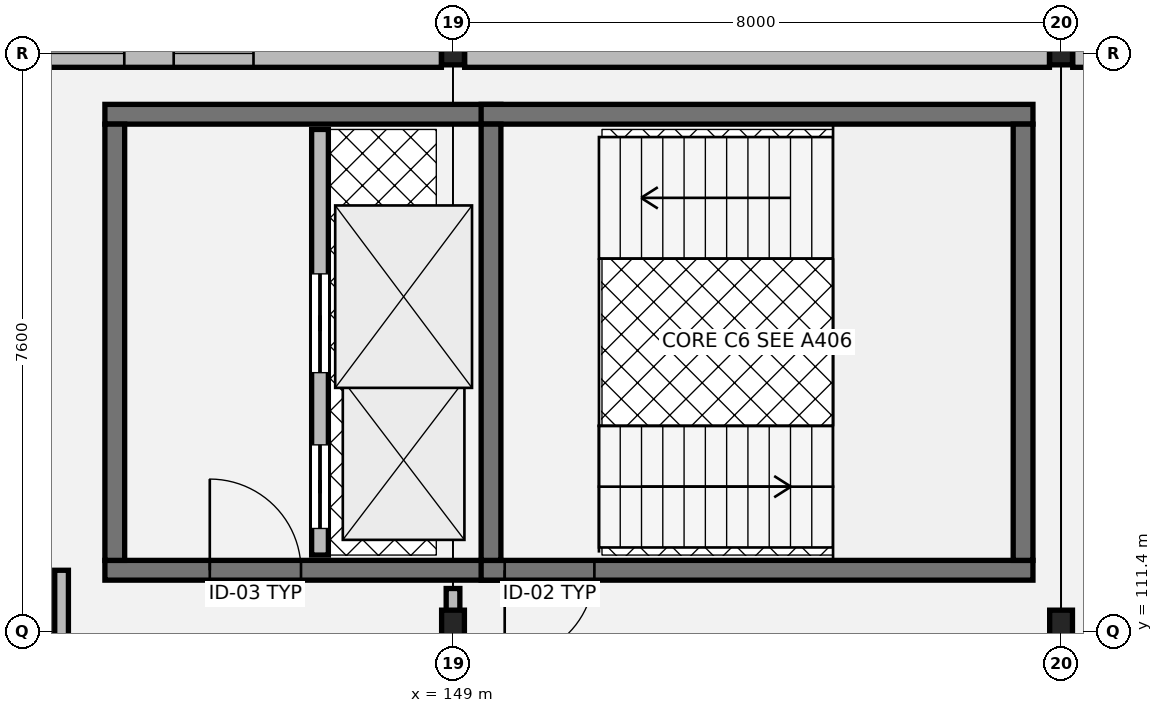
"""IFC4 building model, lengths in metres.
Left out: names, types, materials, properties, quantities, classifications, styles, units other than length and angle.
Written with IfcOpenShell. Run it as: python <this file> out.ifc"""

import sys

from ifc_helpers import new_model, si_unit, direction, frame, frame_2d, origin, origin_2d, place, context, subcontext, project, spatial, rectangle, hollow_rectangle, i_section, extrude, element, fill, save


model = new_model("IFC4")
c1 = context("Model", 3, precision=1e-05, world=origin(), true_north=direction((0.0, 1.0)))
c2 = subcontext(c1, "Body", "Model", "MODEL_VIEW")
j1 = project(units=[si_unit("LENGTHUNIT", "METRE"), si_unit("PLANEANGLEUNIT", "RADIAN")], contexts=[c1])
p1 = place(None, origin())
s1 = spatial("IfcSite", under=j1, at=p1, CompositionType="ELEMENT")
p2 = place(p1, origin())
s2 = spatial("IfcBuilding", under=s1, at=p2, CompositionType="ELEMENT")
p3 = place(p2, frame((0.0, 0.0, 5.1)))
s3 = spatial("IfcBuildingStorey", under=s2, at=p3, CompositionType="ELEMENT", Elevation=5.1)
p4 = place(p3, frame((149.0, 111.4, 0.0), z_axis=(0.0, 0.0, 1.0), x_axis=(1.0, 0.0, 0.0)))
e1 = element("IfcColumn", 1, at=p4, inside=s3, PredefinedType="COLUMN", context=c2, shape_type="SweptSolid", body=[
    extrude(i_section(OverallWidth=0.3, OverallDepth=0.55, WebThickness=0.015, FlangeThickness=0.029, at=origin_2d()), origin(), (0.0, 0.0, 1.0), 4.055),
])
p5 = place(p3, frame((149.0, 119.0, 0.0), z_axis=(0.0, 0.0, 1.0), x_axis=(1.0, 0.0, 0.0)))
e2 = element("IfcColumn", 2, at=p5, inside=s3, PredefinedType="COLUMN", context=c2, shape_type="SweptSolid", body=[
    extrude(hollow_rectangle(XDim=0.3, YDim=0.3, WallThickness=0.012, at=origin_2d()), origin(), (0.0, 0.0, 1.0), 4.055),
])
p6 = place(p3, frame((157.0, 111.4, 0.0), z_axis=(0.0, 0.0, 1.0), x_axis=(1.0, 0.0, 0.0)))
e3 = element("IfcColumn", 3, at=p6, inside=s3, PredefinedType="COLUMN", context=c2, shape_type="SweptSolid", body=[
    extrude(i_section(OverallWidth=0.3, OverallDepth=0.55, WebThickness=0.015, FlangeThickness=0.029, at=origin_2d()), origin(), (0.0, 0.0, 1.0), 4.055),
])
p7 = place(p3, frame((157.0, 119.0, 0.0), z_axis=(0.0, 0.0, 1.0), x_axis=(1.0, 0.0, 0.0)))
e4 = element("IfcColumn", 4, at=p7, inside=s3, PredefinedType="COLUMN", context=c2, shape_type="SweptSolid", body=[
    extrude(hollow_rectangle(XDim=0.3, YDim=0.3, WallThickness=0.012, at=origin_2d()), origin(), (0.0, 0.0, 1.0), 4.055),
])
p8 = place(p3, frame((164.847, 119.0, 0.0), z_axis=(0.0, 0.0, 1.0), x_axis=(-1.0, 0.0, 0.0)))
e5 = element("IfcWall", 5, at=p8, inside=s3, PredefinedType="SOLIDWALL", context=c2, shape_type="SweptSolid", body=[
    extrude(rectangle(XDim=7.694, YDim=0.365, at=frame_2d((3.847, 0.0))), origin(), (0.0, 0.0, 1.0), 3.48),
])
p9 = place(p8, frame((2.502, 0.0, 0.8)))
e6 = element("IfcOpeningElement", 6, at=p9, cuts=e5, PredefinedType="OPENING", context=c2, shape_type="SweptSolid", body=[
    extrude(rectangle(XDim=1.02, YDim=1.98, at=frame_2d((0.51, 0.99))), frame((0.0, 0.192, 0.0), z_axis=(0.0, -1.0, 0.0), x_axis=(1.0, 0.0, 0.0)), (0.0, 0.0, 1.0), 0.385),
])
p10 = place(p8, frame((4.172, 0.0, 0.8)))
e7 = element("IfcOpeningElement", 7, at=p10, cuts=e5, PredefinedType="OPENING", context=c2, shape_type="SweptSolid", body=[
    extrude(rectangle(XDim=1.02, YDim=1.98, at=frame_2d((0.51, 0.99))), frame((0.0, 0.192, 0.0), z_axis=(0.0, -1.0, 0.0), x_axis=(1.0, 0.0, 0.0)), (0.0, 0.0, 1.0), 0.385),
])
p11 = place(p3, frame((156.847, 119.0, 0.0), z_axis=(0.0, 0.0, 1.0), x_axis=(-1.0, 0.0, 0.0)))
e8 = element("IfcWall", 8, at=p11, inside=s3, PredefinedType="SOLIDWALL", context=c2, shape_type="SweptSolid", body=[
    extrude(rectangle(XDim=7.694, YDim=0.365, at=frame_2d((3.847, 0.0))), origin(), (0.0, 0.0, 1.0), 3.48),
])
p12 = place(p3, frame((148.847, 119.0, 0.0), z_axis=(0.0, 0.0, 1.0), x_axis=(-1.0, 0.0, 0.0)))
e9 = element("IfcWall", 9, at=p12, inside=s3, PredefinedType="SOLIDWALL", context=c2, shape_type="SweptSolid", body=[
    extrude(rectangle(XDim=7.694, YDim=0.365, at=frame_2d((3.847, 0.0))), origin(), (0.0, 0.0, 1.0), 3.48),
])
p13 = place(p12, frame((2.472, 0.0, 0.8)))
e10 = element("IfcOpeningElement", 10, at=p13, cuts=e9, PredefinedType="OPENING", context=c2, shape_type="SweptSolid", body=[
    extrude(rectangle(XDim=1.05, YDim=2.05, at=frame_2d((0.525, 1.025))), frame((0.0, 0.192, 0.0), z_axis=(0.0, -1.0, 0.0), x_axis=(1.0, 0.0, 0.0)), (0.0, 0.0, 1.0), 0.385),
])
p14 = place(p12, frame((4.172, 0.0, 0.8)))
e11 = element("IfcOpeningElement", 11, at=p14, cuts=e9, PredefinedType="OPENING", context=c2, shape_type="SweptSolid", body=[
    extrude(rectangle(XDim=1.05, YDim=2.05, at=frame_2d((0.525, 1.025))), frame((0.0, 0.192, 0.0), z_axis=(0.0, -1.0, 0.0), x_axis=(1.0, 0.0, 0.0)), (0.0, 0.0, 1.0), 0.385),
])
p15 = place(p3, frame((144.42, 112.2, 0.0), z_axis=(0.0, 0.0, 1.0), x_axis=(1.0, 0.0, 0.0)))
e12 = element("IfcWall", 12, at=p15, inside=s3, PredefinedType="SHEAR", context=c2, shape_type="SweptSolid", body=[
    extrude(rectangle(XDim=5.21, YDim=0.26, at=frame_2d((2.605, 0.0))), origin(), (0.0, 0.0, 1.0), 3.845),
])
p16 = place(p15, frame((1.38, 0.0, 0.0)))
e13 = element("IfcOpeningElement", 13, at=p16, cuts=e12, PredefinedType="OPENING", context=c2, shape_type="SweptSolid", body=[
    extrude(rectangle(XDim=1.2, YDim=2.16, at=frame_2d((0.6, 1.08))), frame((0.0, 0.14, 0.0), z_axis=(0.0, -1.0, 0.0), x_axis=(1.0, 0.0, 0.0)), (0.0, 0.0, 1.0), 0.28),
])
p17 = place(p3, frame((149.63, 118.2, 0.0), z_axis=(0.0, 0.0, 1.0), x_axis=(-1.0, 0.0, 0.0)))
e14 = element("IfcWall", 14, at=p17, inside=s3, PredefinedType="SHEAR", context=c2, shape_type="SweptSolid", body=[
    extrude(rectangle(XDim=5.21, YDim=0.26, at=frame_2d((2.605, 0.0))), origin(), (0.0, 0.0, 1.0), 3.845),
])
p18 = place(p3, frame((144.55, 118.07, 0.0), z_axis=(0.0, 0.0, 1.0), x_axis=(0.0, -1.0, 0.0)))
e15 = element("IfcWall", 15, at=p18, inside=s3, PredefinedType="SHEAR", context=c2, shape_type="SweptSolid", body=[
    extrude(rectangle(XDim=5.74, YDim=0.26, at=frame_2d((2.87, 0.0))), origin(), (0.0, 0.0, 1.0), 3.845),
])
p19 = place(p3, frame((147.25, 112.4, 0.0), z_axis=(0.0, 0.0, 1.0), x_axis=(0.0, 1.0, 0.0)))
e16 = element("IfcWall", 16, at=p19, inside=s3, PredefinedType="SOLIDWALL", context=c2, shape_type="SweptSolid", body=[
    extrude(rectangle(XDim=5.6, YDim=0.22, at=frame_2d((2.8, 0.0))), origin(), (0.0, 0.0, 1.0), 3.845),
])
p20 = place(p19, frame((0.35, 0.0, 0.0)))
e17 = element("IfcOpeningElement", 17, at=p20, cuts=e16, PredefinedType="OPENING", context=c2, shape_type="SweptSolid", body=[
    extrude(rectangle(XDim=1.1, YDim=2.15, at=frame_2d((0.55, 1.075))), frame((0.0, 0.12, 0.0), z_axis=(0.0, -1.0, 0.0), x_axis=(1.0, 0.0, 0.0)), (0.0, 0.0, 1.0), 0.24),
])
p21 = place(p19, frame((2.4, 0.0, 0.0)))
e18 = element("IfcOpeningElement", 18, at=p21, cuts=e16, PredefinedType="OPENING", context=c2, shape_type="SweptSolid", body=[
    extrude(rectangle(XDim=1.3, YDim=2.18, at=frame_2d((0.65, 1.09))), frame((0.0, 0.12, 0.0), z_axis=(0.0, -1.0, 0.0), x_axis=(1.0, 0.0, 0.0)), (0.0, 0.0, 1.0), 0.24),
])
p22 = place(p3, frame((149.37, 112.2, 0.0), z_axis=(0.0, 0.0, 1.0), x_axis=(1.0, 0.0, 0.0)))
e19 = element("IfcWall", 19, at=p22, inside=s3, PredefinedType="SHEAR", context=c2, shape_type="SweptSolid", body=[
    extrude(rectangle(XDim=7.26, YDim=0.26, at=frame_2d((3.63, 0.0))), origin(), (0.0, 0.0, 1.0), 3.845),
])
p23 = place(p22, frame((0.31, 0.0, 0.0)))
e20 = element("IfcOpeningElement", 20, at=p23, cuts=e19, PredefinedType="OPENING", context=c2, shape_type="SweptSolid", body=[
    extrude(rectangle(XDim=1.18, YDim=2.18, at=frame_2d((0.59, 1.09))), frame((0.0, 0.14, 0.0), z_axis=(0.0, -1.0, 0.0), x_axis=(1.0, 0.0, 0.0)), (0.0, 0.0, 1.0), 0.28),
])
p24 = place(p3, frame((149.37, 118.2, 0.0), z_axis=(0.0, 0.0, 1.0), x_axis=(1.0, 0.0, 0.0)))
e21 = element("IfcWall", 21, at=p24, inside=s3, PredefinedType="SHEAR", context=c2, shape_type="SweptSolid", body=[
    extrude(rectangle(XDim=7.26, YDim=0.26, at=frame_2d((3.63, 0.0))), origin(), (0.0, 0.0, 1.0), 3.845),
])
for number, where, z_axis, x_axis in (
    (22, (149.5, 112.33, 0.0), (0.0, 0.0, 1.0), (0.0, 1.0, 0.0)),
    (23, (156.5, 112.33, 0.0), (0.0, 0.0, 1.0), (0.0, 1.0, 0.0)),
):
    element("IfcWall", number, at=place(p3, frame(where, z_axis=z_axis, x_axis=x_axis)), inside=s3, PredefinedType="SHEAR", context=c2, shape_type="SweptSolid", body=[
        extrude(rectangle(XDim=5.74, YDim=0.26, at=frame_2d((2.87, 0.0))), origin(), (0.0, 0.0, 1.0), 3.845),
    ])
p25 = place(p3, frame((149.0, 111.64, 0.0), z_axis=(0.0, 0.0, 1.0), x_axis=(0.0, 1.0, 0.0)))
e24 = element("IfcWall", 24, at=p25, inside=s3, PredefinedType="PARTITIONING", context=c2, shape_type="SweptSolid", body=[
    extrude(rectangle(XDim=0.32, YDim=0.18, at=frame_2d((0.16, 0.0))), origin(), (0.0, 0.0, 1.0), 3.18),
])
p26 = place(p3, frame((143.85, 110.76, 0.0), z_axis=(0.0, 0.0, 1.0), x_axis=(0.0, 1.0, 0.0)))
e25 = element("IfcWall", 25, at=p26, inside=s3, PredefinedType="PARTITIONING", context=c2, shape_type="SweptSolid", body=[
    extrude(rectangle(XDim=1.44, YDim=0.18, at=frame_2d((0.72, 0.0))), origin(), (0.0, 0.0, 1.0), 3.18),
])
p27 = place(p13, origin())
e26 = element("IfcWindow", 26, at=p27, inside=s3, PartitioningType="SINGLE_PANEL", PredefinedType="WINDOW", context=c2, shape_type="SweptSolid", body=[
    extrude(rectangle(XDim=1.05, YDim=2.05, at=frame_2d((0.525, 1.025))), frame((0.0, 0.03, 0.0), z_axis=(0.0, -1.0, 0.0), x_axis=(1.0, 0.0, 0.0)), (0.0, 0.0, 1.0), 0.06),
])
fill(e10, e26)
p28 = place(p14, origin())
e27 = element("IfcWindow", 27, at=p28, inside=s3, PartitioningType="SINGLE_PANEL", PredefinedType="WINDOW", context=c2, shape_type="SweptSolid", body=[
    extrude(rectangle(XDim=1.05, YDim=2.05, at=frame_2d((0.525, 1.025))), frame((0.0, 0.03, 0.0), z_axis=(0.0, -1.0, 0.0), x_axis=(1.0, 0.0, 0.0)), (0.0, 0.0, 1.0), 0.06),
])
fill(e11, e27)
p29 = place(p16, origin())
e28 = element("IfcDoor", 28, at=p29, inside=s3, OperationType="SINGLE_SWING_LEFT", PredefinedType="DOOR", context=c2, shape_type="SweptSolid", body=[
    extrude(rectangle(XDim=1.2, YDim=2.16, at=frame_2d((0.6, 1.08))), frame((0.0, 0.025, 0.0), z_axis=(0.0, -1.0, 0.0), x_axis=(1.0, 0.0, 0.0)), (0.0, 0.0, 1.0), 0.05),
])
fill(e13, e28)
p30 = place(p20, origin())
e29 = element("IfcDoor", 29, at=p30, inside=s3, OperationType="SLIDING_TO_LEFT", PredefinedType="DOOR", context=c2, shape_type="SweptSolid", body=[
    extrude(rectangle(XDim=1.1, YDim=2.15, at=frame_2d((0.55, 1.075))), frame((0.0, 0.025, 0.0), z_axis=(0.0, -1.0, 0.0), x_axis=(1.0, 0.0, 0.0)), (0.0, 0.0, 1.0), 0.05),
])
fill(e17, e29)
p31 = place(p21, origin())
e30 = element("IfcDoor", 30, at=p31, inside=s3, OperationType="SLIDING_TO_LEFT", PredefinedType="DOOR", context=c2, shape_type="SweptSolid", body=[
    extrude(rectangle(XDim=1.3, YDim=2.18, at=frame_2d((0.65, 1.09))), frame((0.0, 0.025, 0.0), z_axis=(0.0, -1.0, 0.0), x_axis=(1.0, 0.0, 0.0)), (0.0, 0.0, 1.0), 0.05),
])
fill(e18, e30)
p32 = place(p23, origin())
e31 = element("IfcDoor", 31, at=p32, inside=s3, OperationType="SINGLE_SWING_RIGHT", PredefinedType="DOOR", context=c2, shape_type="SweptSolid", body=[
    extrude(rectangle(XDim=1.18, YDim=2.18, at=frame_2d((0.59, 1.09))), frame((0.0, 0.025, 0.0), z_axis=(0.0, -1.0, 0.0), x_axis=(1.0, 0.0, 0.0)), (0.0, 0.0, 1.0), 0.05),
])
fill(e20, e31)
save(model, sys.argv[1])
